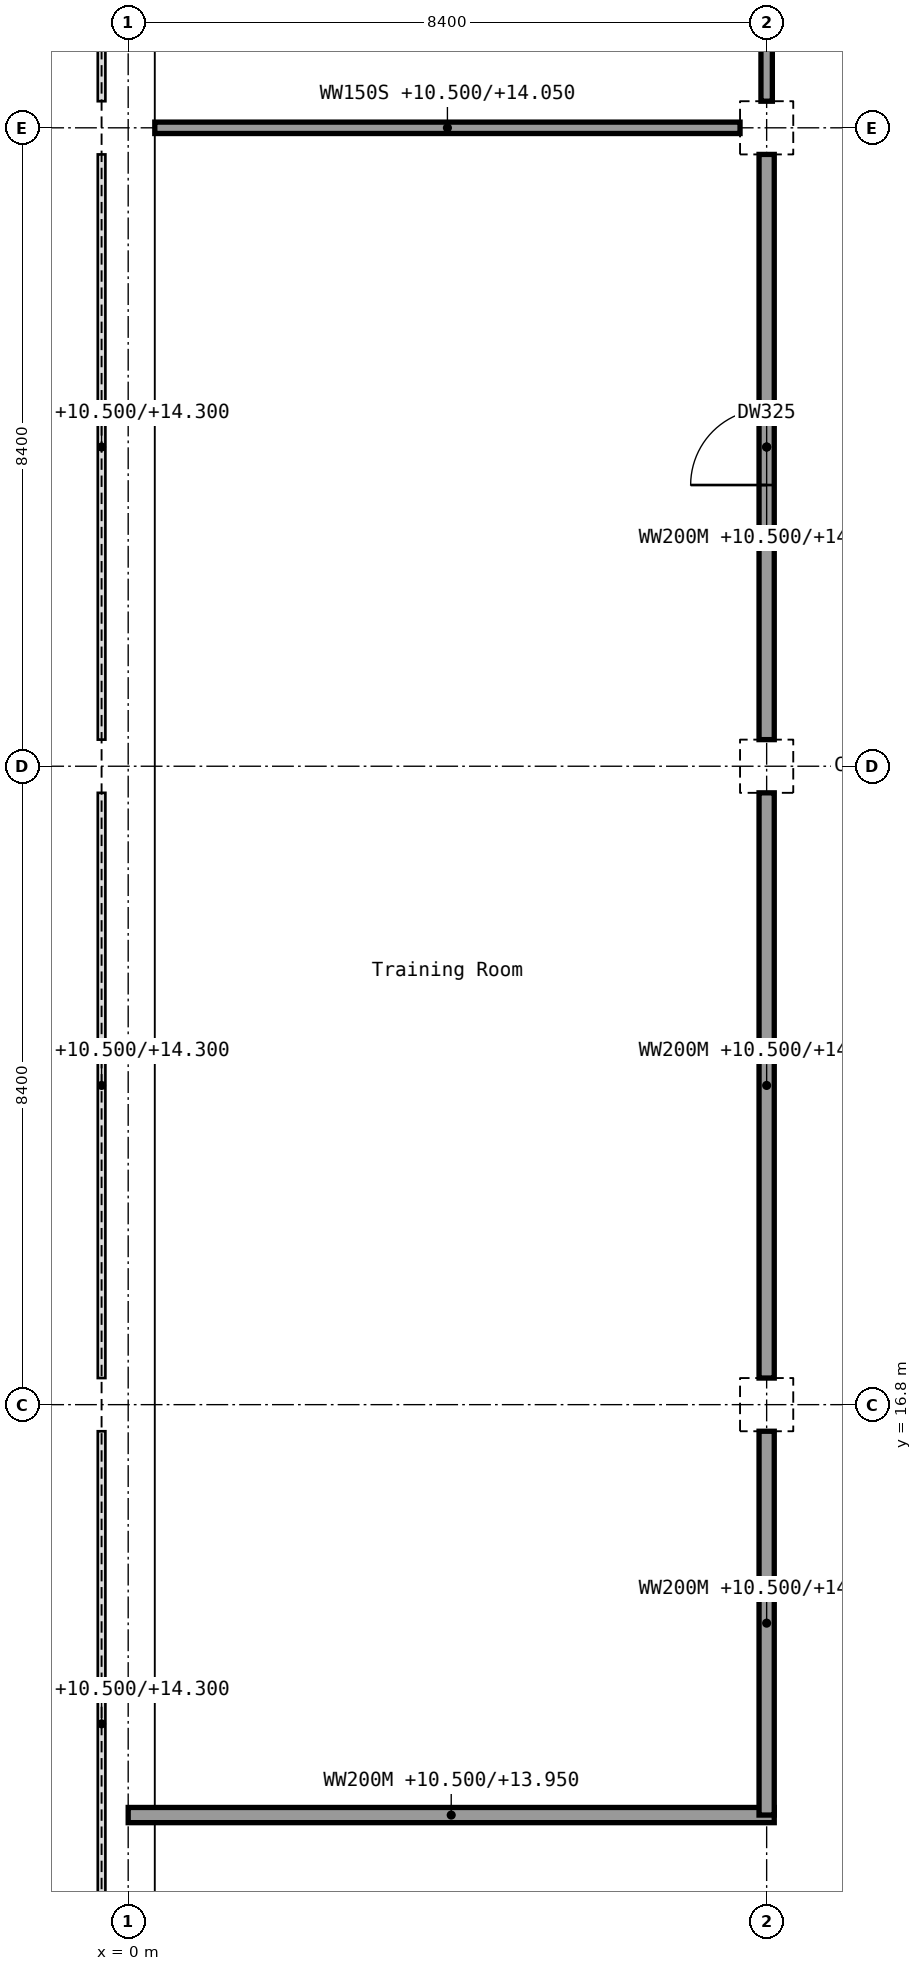
"""IFC4 building model, lengths in metres.
Left out: names, types, materials, properties, quantities, classifications, styles, units other than length and angle.
Written with IfcOpenShell. Run it as: python <this file> out.ifc"""

import sys

from ifc_helpers import new_model, si_unit, direction, frame, frame_2d, origin, origin_2d, place, context, subcontext, project, spatial, rectangle, extrude, element, fill, save


model = new_model("IFC4")
c1 = context("Model", 3, precision=1e-05, world=origin(), true_north=direction((0.0, 1.0)))
c2 = subcontext(c1, "Body", "Model", "MODEL_VIEW")
j1 = project(units=[si_unit("LENGTHUNIT", "METRE"), si_unit("PLANEANGLEUNIT", "RADIAN")], contexts=[c1])
p1 = place(None, origin())
s1 = spatial("IfcSite", under=j1, at=p1, CompositionType="ELEMENT")
p2 = place(p1, origin())
s2 = spatial("IfcBuilding", under=s1, at=p2, CompositionType="ELEMENT")
p3 = place(p2, frame((0.0, 0.0, 10.5)))
s3 = spatial("IfcBuildingStorey", under=s2, at=p3, CompositionType="ELEMENT", Elevation=10.5)
for number, where, z_axis, x_axis in (
    (1, (0.0, 16.8, 0.0), (0.0, 0.0, 1.0), (1.0, 0.0, 0.0)),
    (2, (0.0, 25.2, 0.0), (0.0, 0.0, 1.0), (1.0, 0.0, 0.0)),
    (3, (0.0, 33.6, 0.0), (0.0, 0.0, 1.0), (1.0, 0.0, 0.0)),
    (4, (8.4, 16.8, 0.0), (0.0, 0.0, 1.0), (1.0, 0.0, 0.0)),
    (5, (8.4, 25.2, 0.0), (0.0, 0.0, 1.0), (1.0, 0.0, 0.0)),
    (6, (8.4, 33.6, 0.0), (0.0, 0.0, 1.0), (1.0, 0.0, 0.0)),
):
    element("IfcColumn", number, at=place(p3, frame(where, z_axis=z_axis, x_axis=x_axis)), inside=s3, PredefinedType="COLUMN", context=c2, shape_type="SweptSolid", body=[
        extrude(rectangle(XDim=0.7, YDim=0.7, at=origin_2d()), origin(), (0.0, 0.0, 1.0), 4.5),
    ])
p4 = place(p3, frame((0.0, 11.4, 0.0), z_axis=(0.0, 0.0, 1.0), x_axis=(1.0, 0.0, 0.0)))
e7 = element("IfcWall", 7, at=p4, inside=s3, PredefinedType="PARTITIONING", context=c2, shape_type="SweptSolid", body=[
    extrude(rectangle(XDim=8.5, YDim=0.2, at=frame_2d((4.25, 0.0))), origin(), (0.0, 0.0, 1.0), 3.45),
])
p5 = place(p3, frame((0.35, 33.6, 0.0), z_axis=(0.0, 0.0, 1.0), x_axis=(1.0, 0.0, 0.0)))
e8 = element("IfcWall", 8, at=p5, inside=s3, PredefinedType="PARTITIONING", context=c2, shape_type="SweptSolid", body=[
    extrude(rectangle(XDim=7.7, YDim=0.15, at=frame_2d((3.85, 0.0))), origin(), (0.0, 0.0, 1.0), 3.55),
])
p6 = place(p3, frame((8.4, 11.4, 0.0), z_axis=(0.0, 0.0, 1.0), x_axis=(0.0, 1.0, 0.0)))
e9 = element("IfcWall", 9, at=p6, inside=s3, PredefinedType="PARTITIONING", context=c2, shape_type="SweptSolid", body=[
    extrude(rectangle(XDim=5.05, YDim=0.2, at=frame_2d((2.525, 0.0))), origin(), (0.0, 0.0, 1.0), 3.55),
])
p7 = place(p3, frame((8.4, 17.15, 0.0), z_axis=(0.0, 0.0, 1.0), x_axis=(0.0, 1.0, 0.0)))
e10 = element("IfcWall", 10, at=p7, inside=s3, PredefinedType="PARTITIONING", context=c2, shape_type="SweptSolid", body=[
    extrude(rectangle(XDim=7.7, YDim=0.2, at=frame_2d((3.85, 0.0))), origin(), (0.0, 0.0, 1.0), 3.55),
])
p8 = place(p3, frame((8.4, 25.55, 0.0), z_axis=(0.0, 0.0, 1.0), x_axis=(0.0, 1.0, 0.0)))
e11 = element("IfcWall", 11, at=p8, inside=s3, PredefinedType="PARTITIONING", context=c2, shape_type="SweptSolid", body=[
    extrude(rectangle(XDim=7.7, YDim=0.2, at=frame_2d((3.85, 0.0))), origin(), (0.0, 0.0, 1.0), 3.55),
])
p9 = place(p8, frame((3.35, 0.0, 0.0)))
e12 = element("IfcOpeningElement", 12, at=p9, cuts=e11, PredefinedType="OPENING", context=c2, shape_type="SweptSolid", body=[
    extrude(rectangle(XDim=1.0, YDim=2.1, at=frame_2d((0.5, 1.05))), frame((0.0, 0.1, 0.0), z_axis=(0.0, -1.0, 0.0), x_axis=(1.0, 0.0, 0.0)), (0.0, 0.0, 1.0), 0.2),
])
p10 = place(p3, frame((8.4, 33.95, 0.0), z_axis=(0.0, 0.0, 1.0), x_axis=(0.0, 1.0, 0.0)))
e13 = element("IfcWall", 13, at=p10, inside=s3, PredefinedType="PARTITIONING", context=c2, shape_type="SweptSolid", body=[
    extrude(rectangle(XDim=5.05, YDim=0.15, at=frame_2d((2.525, 0.0))), origin(), (0.0, 0.0, 1.0), 3.55),
])
p11 = place(p10, frame((2.025, 0.0, 0.0)))
e14 = element("IfcOpeningElement", 14, at=p11, cuts=e13, PredefinedType="OPENING", context=c2, shape_type="SweptSolid", body=[
    extrude(rectangle(XDim=1.0, YDim=2.1, at=frame_2d((0.5, 1.05))), frame((0.0, 0.075, 0.0), z_axis=(0.0, -1.0, 0.0), x_axis=(1.0, 0.0, 0.0)), (0.0, 0.0, 1.0), 0.15),
])
p12 = place(p9, origin())
e15 = element("IfcDoor", 15, at=p12, inside=s3, OperationType="SINGLE_SWING_LEFT", PredefinedType="DOOR", context=c2, shape_type="SweptSolid", body=[
    extrude(rectangle(XDim=1.0, YDim=2.1, at=frame_2d((0.5, 1.05))), frame((0.0, 0.025, 0.0), z_axis=(0.0, -1.0, 0.0), x_axis=(1.0, 0.0, 0.0)), (0.0, 0.0, 1.0), 0.05),
])
fill(e12, e15)
save(model, sys.argv[1])
